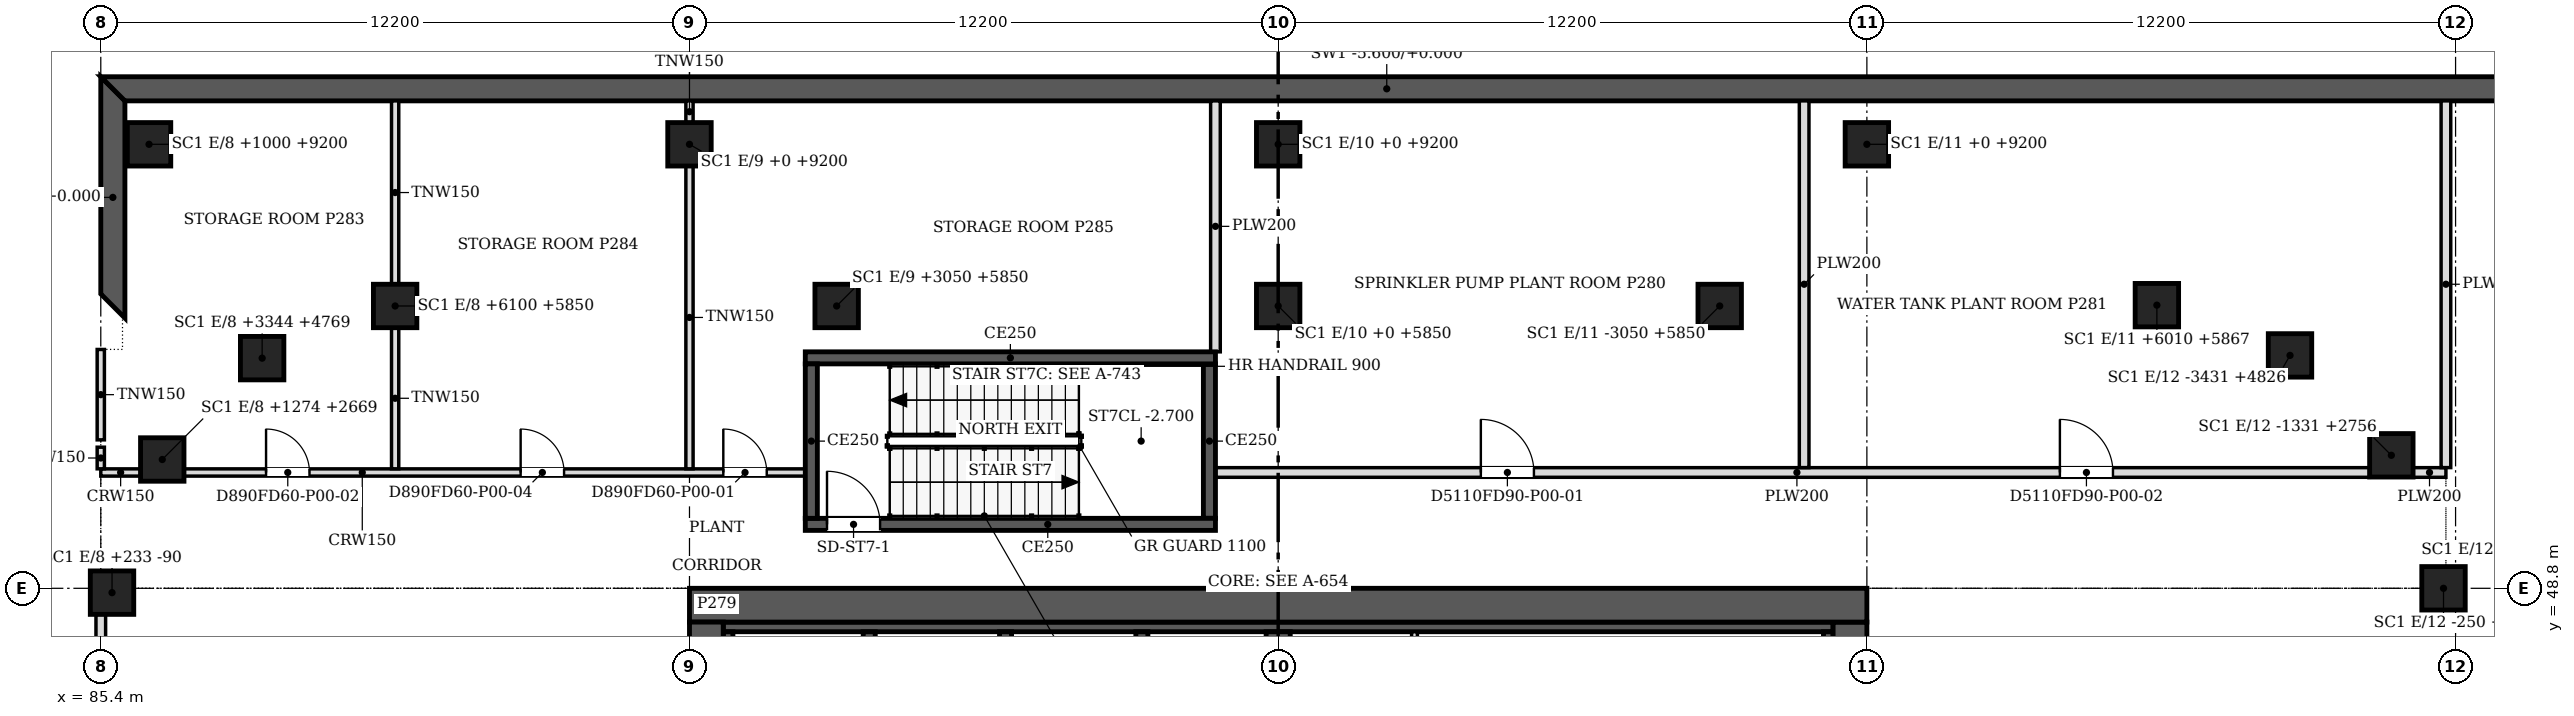
"""IFC4 building model, lengths in metres.
Left out: names, types, materials, properties, quantities, classifications, styles, units other than length and angle.
Written with IfcOpenShell. Run it as: python <this file> out.ifc"""

import sys

from ifc_helpers import new_model, si_unit, direction, frame, frame_2d, origin, origin_2d, place, context, subcontext, project, spatial, polyline, rectangle, outline, extrude, source, transform, mapped, element, fill, save


model = new_model("IFC4")
c1 = context("Model", 3, precision=1e-05, world=origin(), true_north=direction((0.0, 1.0)))
c2 = subcontext(c1, "Body", "Model", "MODEL_VIEW")
j1 = project(units=[si_unit("LENGTHUNIT", "METRE"), si_unit("PLANEANGLEUNIT", "RADIAN")], contexts=[c1])
p1 = place(None, origin())
s1 = spatial("IfcSite", under=j1, at=p1, CompositionType="ELEMENT")
p2 = place(p1, origin())
s2 = spatial("IfcBuilding", under=s1, at=p2, CompositionType="ELEMENT")
p3 = place(p2, frame((0.0, 0.0, -5.4)))
s3 = spatial("IfcBuildingStorey", under=s2, at=p3, CompositionType="ELEMENT", Elevation=-5.4)
p4 = place(p3, frame((0.0, 0.0, -0.2)))
e1 = element("IfcWall", 1, at=p4, inside=s3, PredefinedType="SOLIDWALL", context=c2, shape_type="SweptSolid", body=[
    extrude(outline(polyline([(60.5, 54.4), (85.9, 54.4), (85.4, 54.9), (61.0, 54.9), (60.5, 54.4)])), origin(), (0.0, 0.0, 1.0), 5.6),
])
p5 = place(p3, frame((0.0, 0.0, -0.2)))
e2 = element("IfcWall", 2, at=p5, inside=s3, PredefinedType="SOLIDWALL", context=c2, shape_type="SweptSolid", body=[
    extrude(outline(polyline([(85.4, 54.9), (85.9, 54.4), (85.9, 58.9), (85.4, 59.4), (85.4, 54.9)])), origin(), (0.0, 0.0, 1.0), 5.6),
])
p6 = place(p3, frame((0.0, 0.0, -0.2)))
e3 = element("IfcWall", 3, at=p6, inside=s3, PredefinedType="SOLIDWALL", context=c2, shape_type="SweptSolid", body=[
    extrude(outline(polyline([(85.4, 59.4), (85.9, 58.9), (138.2, 58.9), (138.7, 59.4), (85.4, 59.4)])), origin(), (0.0, 0.0, 1.0), 5.6),
])
for number, where, z_axis, x_axis in (
    (4, (133.95, 48.8, 0.0), (0.0, 0.0, 1.0), (1.0, 0.0, 0.0)),
    (5, (132.869, 51.556, 0.0), (0.0, 0.0, 1.0), (1.0, 0.0, 0.0)),
    (6, (130.769, 53.626, 0.0), (0.0, 0.0, 1.0), (1.0, 0.0, 0.0)),
    (7, (128.01, 54.667, 0.0), (0.0, 0.0, 1.0), (1.0, 0.0, 0.0)),
    (8, (118.95, 54.65, 0.0), (0.0, 0.0, 1.0), (1.0, 0.0, 0.0)),
    (9, (109.8, 54.65, 0.0), (0.0, 0.0, 1.0), (1.0, 0.0, 0.0)),
    (10, (100.65, 54.65, 0.0), (0.0, 0.0, 1.0), (1.0, 0.0, 0.0)),
    (11, (91.5, 54.65, 0.0), (0.0, 0.0, 1.0), (1.0, 0.0, 0.0)),
    (12, (88.744, 53.569, 0.0), (0.0, 0.0, 1.0), (1.0, 0.0, 0.0)),
    (13, (86.674, 51.469, 0.0), (0.0, 0.0, 1.0), (1.0, 0.0, 0.0)),
    (14, (85.633, 48.71, 0.0), (0.0, 0.0, 1.0), (1.0, 0.0, 0.0)),
    (15, (97.6, 58.0, 0.0), (0.0, 0.0, 1.0), (1.0, 0.0, 0.0)),
    (16, (109.8, 58.0, 0.0), (0.0, 0.0, 1.0), (1.0, 0.0, 0.0)),
    (17, (122.0, 58.0, 0.0), (0.0, 0.0, 1.0), (1.0, 0.0, 0.0)),
    (18, (85.4, 54.2, 0.0), (0.0, 0.0, 1.0), (1.0, 0.0, 0.0)),
    (19, (86.4, 58.0, 0.0), (0.0, 0.0, 1.0), (1.0, 0.0, 0.0)),
):
    element("IfcColumn", number, at=place(p3, frame(where, z_axis=z_axis, x_axis=x_axis)), inside=s3, PredefinedType="COLUMN", context=c2, shape_type="SweptSolid", body=[
        extrude(rectangle(XDim=0.9, YDim=0.9, at=origin_2d()), origin(), (0.0, 0.0, 1.0), 5.15),
    ])
p7 = place(p3, frame((97.95, 37.3, 0.0), z_axis=(0.0, 0.0, 1.0), x_axis=(0.0, 1.0, 0.0)))
e20 = element("IfcWall", 20, at=p7, inside=s3, PredefinedType="SHEAR", context=c2, shape_type="SweptSolid", body=[
    extrude(rectangle(XDim=10.8, YDim=0.7, at=frame_2d((5.4, 0.0))), origin(), (0.0, 0.0, 1.0), 5.4),
])
m1 = source(origin(), c2, "Body", "SweptSolid", [
    extrude(rectangle(XDim=2.1, YDim=2.4, at=frame_2d((1.05, 1.2))), frame((0.0, 0.36, 0.0), z_axis=(0.0, -1.0, 0.0), x_axis=(1.0, 0.0, 0.0)), (0.0, 0.0, 1.0), 0.72),
])
p8 = place(p7, frame((4.5, 0.0, 0.0)))
e21 = element("IfcOpeningElement", 21, at=p8, cuts=e20, PredefinedType="OPENING", context=c2, shape_type="MappedRepresentation", body=[
    mapped(m1, transform((0.0, 0.0, 0.0), scale=1.0)),
])
p9 = place(p3, frame((97.6, 48.45, 0.0), z_axis=(0.0, 0.0, 1.0), x_axis=(1.0, 0.0, 0.0)))
e22 = element("IfcWall", 22, at=p9, inside=s3, PredefinedType="SHEAR", context=c2, shape_type="SweptSolid", body=[
    extrude(rectangle(XDim=24.4, YDim=0.7, at=frame_2d((12.2, 0.0))), origin(), (0.0, 0.0, 1.0), 5.4),
])
p10 = place(p3, frame((121.65, 48.1, 0.0), z_axis=(0.0, 0.0, 1.0), x_axis=(0.0, -1.0, 0.0)))
e23 = element("IfcWall", 23, at=p10, inside=s3, PredefinedType="SHEAR", context=c2, shape_type="SweptSolid", body=[
    extrude(rectangle(XDim=10.8, YDim=0.7, at=frame_2d((5.4, 0.0))), origin(), (0.0, 0.0, 1.0), 5.4),
])
m2 = source(origin(), c2, "Body", "SweptSolid", [
    extrude(rectangle(XDim=1.2, YDim=2.1, at=frame_2d((0.6, 1.05))), frame((0.0, 0.36, 0.0), z_axis=(0.0, -1.0, 0.0), x_axis=(1.0, 0.0, 0.0)), (0.0, 0.0, 1.0), 0.72),
])
p11 = place(p10, frame((4.55, 0.0, 0.0)))
e24 = element("IfcOpeningElement", 24, at=p11, cuts=e23, PredefinedType="OPENING", context=c2, shape_type="MappedRepresentation", body=[
    mapped(m2, transform((0.0, 0.0, 0.0), scale=1.0)),
])
p12 = place(p3, frame((98.3, 48.0, 0.0), z_axis=(0.0, 0.0, 1.0), x_axis=(1.0, 0.0, 0.0)))
e25 = element("IfcWall", 25, at=p12, inside=s3, PredefinedType="SOLIDWALL", context=c2, shape_type="SweptSolid", body=[
    extrude(rectangle(XDim=23.0, YDim=0.2, at=frame_2d((11.5, 0.0))), origin(), (0.0, 0.0, 1.0), 5.4),
])
p13 = place(p3, frame((98.4, 43.9, 0.0), z_axis=(0.0, 0.0, 1.0), x_axis=(0.0, 1.0, 0.0)))
e26 = element("IfcWall", 26, at=p13, inside=s3, PredefinedType="SOLIDWALL", context=c2, shape_type="SweptSolid", body=[
    extrude(rectangle(XDim=4.0, YDim=0.2, at=frame_2d((2.0, 0.0))), origin(), (0.0, 0.0, 1.0), 5.4),
])
p14 = place(p3, frame((121.2, 43.55, 0.0), z_axis=(0.0, 0.0, 1.0), x_axis=(0.0, 1.0, 0.0)))
e27 = element("IfcWall", 27, at=p14, inside=s3, PredefinedType="SOLIDWALL", context=c2, shape_type="SweptSolid", body=[
    extrude(rectangle(XDim=4.35, YDim=0.2, at=frame_2d((2.175, 0.0))), origin(), (0.0, 0.0, 1.0), 5.4),
])
p15 = place(p3, frame((109.8, 45.2, 0.0), z_axis=(0.0, 0.0, 1.0), x_axis=(0.0, 1.0, 0.0)))
e28 = element("IfcWall", 28, at=p15, inside=s3, PredefinedType="SHEAR", context=c2, shape_type="SweptSolid", body=[
    extrude(rectangle(XDim=2.7, YDim=0.5, at=frame_2d((1.35, 0.0))), origin(), (0.0, 0.0, 1.0), 5.4),
])
for number, where, z_axis, x_axis in (
    (29, (101.325, 45.325, 0.0), (0.0, 0.0, 1.0), (0.0, 1.0, 0.0)),
    (30, (104.15, 45.325, 0.0), (0.0, 0.0, 1.0), (0.0, 1.0, 0.0)),
    (31, (106.975, 45.325, 0.0), (0.0, 0.0, 1.0), (0.0, 1.0, 0.0)),
):
    element("IfcWall", number, at=place(p3, frame(where, z_axis=z_axis, x_axis=x_axis)), inside=s3, PredefinedType="SOLIDWALL", context=c2, shape_type="SweptSolid", body=[
        extrude(rectangle(XDim=2.575, YDim=0.25, at=frame_2d((1.288, 0.0))), origin(), (0.0, 0.0, 1.0), 5.4),
    ])
p16 = place(p3, frame((112.625, 45.26, 0.0), z_axis=(0.0, 0.0, 1.0), x_axis=(0.0, 1.0, 0.0)))
e32 = element("IfcWall", 32, at=p16, inside=s3, PredefinedType="PARTITIONING", context=c2, shape_type="SweptSolid", body=[
    extrude(rectangle(XDim=2.64, YDim=0.12, at=frame_2d((1.32, 0.0))), origin(), (0.0, 0.0, 1.0), 5.15),
])
p17 = place(p3, frame((108.5, 50.125, 0.0), z_axis=(0.0, 0.0, 1.0), x_axis=(-1.0, 0.0, 0.0)))
e33 = element("IfcWall", 33, at=p17, inside=s3, PredefinedType="SOLIDWALL", context=c2, shape_type="SweptSolid", body=[
    extrude(rectangle(XDim=8.5, YDim=0.25, at=frame_2d((4.25, 0.0))), origin(), (0.0, 0.0, 1.0), 5.4),
])
m3 = source(origin(), c2, "Body", "SweptSolid", [
    extrude(rectangle(XDim=1.1, YDim=2.1, at=frame_2d((0.55, 1.05))), frame((0.0, 0.135, 0.0), z_axis=(0.0, -1.0, 0.0), x_axis=(1.0, 0.0, 0.0)), (0.0, 0.0, 1.0), 0.27),
])
p18 = place(p17, frame((6.95, 0.0, 0.0)))
e34 = element("IfcOpeningElement", 34, at=p18, cuts=e33, PredefinedType="OPENING", context=c2, shape_type="MappedRepresentation", body=[
    mapped(m3, transform((0.0, 0.0, 0.0), scale=1.0)),
])
p19 = place(p3, frame((100.125, 50.25, 0.0), z_axis=(0.0, 0.0, 1.0), x_axis=(0.0, 1.0, 0.0)))
e35 = element("IfcWall", 35, at=p19, inside=s3, PredefinedType="SOLIDWALL", context=c2, shape_type="SweptSolid", body=[
    extrude(rectangle(XDim=3.2, YDim=0.25, at=frame_2d((1.6, 0.0))), origin(), (0.0, 0.0, 1.0), 5.4),
])
p20 = place(p3, frame((100.0, 53.575, 0.0), z_axis=(0.0, 0.0, 1.0), x_axis=(1.0, 0.0, 0.0)))
e36 = element("IfcWall", 36, at=p20, inside=s3, PredefinedType="SOLIDWALL", context=c2, shape_type="SweptSolid", body=[
    extrude(rectangle(XDim=8.5, YDim=0.25, at=frame_2d((4.25, 0.0))), origin(), (0.0, 0.0, 1.0), 5.4),
])
p21 = place(p3, frame((108.375, 53.45, 0.0), z_axis=(0.0, 0.0, 1.0), x_axis=(0.0, -1.0, 0.0)))
e37 = element("IfcWall", 37, at=p21, inside=s3, PredefinedType="SOLIDWALL", context=c2, shape_type="SweptSolid", body=[
    extrude(rectangle(XDim=3.2, YDim=0.25, at=frame_2d((1.6, 0.0))), origin(), (0.0, 0.0, 1.0), 5.4),
])
p22 = place(p3, frame((85.4, 42.101, 0.0), z_axis=(0.0, 0.0, 1.0), x_axis=(0.0, 1.0, 0.0)))
e38 = element("IfcWall", 38, at=p22, inside=s3, PredefinedType="PARTITIONING", context=c2, shape_type="SweptSolid", body=[
    extrude(rectangle(XDim=6.158, YDim=0.2, at=frame_2d((3.079, 0.0))), origin(), (0.0, 0.0, 1.0), 4.315),
])
p23 = place(p3, frame((73.651, 48.8, 0.0), z_axis=(0.0, 0.0, 1.0), x_axis=(1.0, 0.0, 0.0)))
e39 = element("IfcWall", 39, at=p23, inside=s3, PredefinedType="PARTITIONING", context=c2, shape_type="SweptSolid", body=[
    extrude(rectangle(XDim=11.531, YDim=0.2, at=frame_2d((5.766, 0.0))), origin(), (0.0, 0.0, 1.0), 4.315),
])
p24 = place(p3, frame((85.4, 51.2, 0.0), z_axis=(0.0, 0.0, 1.0), x_axis=(1.0, 0.0, 0.0)))
e40 = element("IfcWall", 40, at=p24, inside=s3, PredefinedType="PARTITIONING", context=c2, shape_type="SweptSolid", body=[
    extrude(rectangle(XDim=0.823, YDim=0.15, at=frame_2d((0.412, 0.0))), origin(), (0.0, 0.0, 1.0), 4.315),
])
p25 = place(p3, frame((87.125, 51.2, 0.0), z_axis=(0.0, 0.0, 1.0), x_axis=(1.0, 0.0, 0.0)))
e41 = element("IfcWall", 41, at=p25, inside=s3, PredefinedType="PARTITIONING", context=c2, shape_type="SweptSolid", body=[
    extrude(rectangle(XDim=12.875, YDim=0.15, at=frame_2d((6.438, 0.0))), origin(), (0.0, 0.0, 1.0), 4.315),
])
m4 = source(origin(), c2, "Body", "SweptSolid", [
    extrude(rectangle(XDim=0.9, YDim=2.1, at=frame_2d((0.45, 1.05))), frame((0.0, 0.085, 0.0), z_axis=(0.0, -1.0, 0.0), x_axis=(1.0, 0.0, 0.0)), (0.0, 0.0, 1.0), 0.17),
])
p26 = place(p25, frame((11.176, 0.0, 0.0)))
e42 = element("IfcOpeningElement", 42, at=p26, cuts=e41, PredefinedType="OPENING", context=c2, shape_type="MappedRepresentation", body=[
    mapped(m4, transform((0.0, 0.0, 0.0), scale=1.0)),
])
p27 = place(p25, frame((1.7, 0.0, 0.0)))
e43 = element("IfcOpeningElement", 43, at=p27, cuts=e41, PredefinedType="OPENING", context=c2, shape_type="MappedRepresentation", body=[
    mapped(m4, transform((0.0, 0.0, 0.0), scale=1.0)),
])
p28 = place(p25, frame((6.976, 0.0, 0.0)))
e44 = element("IfcOpeningElement", 44, at=p28, cuts=e41, PredefinedType="OPENING", context=c2, shape_type="MappedRepresentation", body=[
    mapped(m4, transform((0.0, 0.0, 0.0), scale=1.0)),
])
p29 = place(p3, frame((108.5, 51.2, 0.0), z_axis=(0.0, 0.0, 1.0), x_axis=(1.0, 0.0, 0.0)))
e45 = element("IfcWall", 45, at=p29, inside=s3, PredefinedType="PARTITIONING", context=c2, shape_type="SweptSolid", body=[
    extrude(rectangle(XDim=23.918, YDim=0.2, at=frame_2d((11.959, 0.0))), origin(), (0.0, 0.0, 1.0), 4.315),
])
m5 = source(origin(), c2, "Body", "SweptSolid", [
    extrude(rectangle(XDim=1.1, YDim=2.1, at=frame_2d((0.55, 1.05))), frame((0.0, 0.11, 0.0), z_axis=(0.0, -1.0, 0.0), x_axis=(1.0, 0.0, 0.0)), (0.0, 0.0, 1.0), 0.22),
])
p30 = place(p29, frame((5.5, 0.0, 0.0)))
e46 = element("IfcOpeningElement", 46, at=p30, cuts=e45, PredefinedType="OPENING", context=c2, shape_type="MappedRepresentation", body=[
    mapped(m5, transform((0.0, 0.0, 0.0), scale=1.0)),
])
p31 = place(p29, frame((17.5, 0.0, 0.0)))
e47 = element("IfcOpeningElement", 47, at=p31, cuts=e45, PredefinedType="OPENING", context=c2, shape_type="MappedRepresentation", body=[
    mapped(m5, transform((0.0, 0.0, 0.0), scale=1.0)),
])
p32 = place(p3, frame((133.32, 51.2, 0.0), z_axis=(0.0, 0.0, 1.0), x_axis=(1.0, 0.0, 0.0)))
e48 = element("IfcWall", 48, at=p32, inside=s3, PredefinedType="PARTITIONING", context=c2, shape_type="SweptSolid", body=[
    extrude(rectangle(XDim=0.68, YDim=0.2, at=frame_2d((0.34, 0.0))), origin(), (0.0, 0.0, 1.0), 4.315),
])
p33 = place(p3, frame((85.4, 51.276, 0.0), z_axis=(0.0, 0.0, 1.0), x_axis=(0.0, 1.0, 0.0)))
e49 = element("IfcWall", 49, at=p33, inside=s3, PredefinedType="PARTITIONING", context=c2, shape_type="SweptSolid", body=[
    extrude(rectangle(XDim=0.448, YDim=0.15, at=frame_2d((0.224, 0.0))), origin(), (0.0, 0.0, 1.0), 4.315),
])
p34 = place(p3, frame((91.5, 51.276, 0.0), z_axis=(0.0, 0.0, 1.0), x_axis=(0.0, 1.0, 0.0)))
e50 = element("IfcWall", 50, at=p34, inside=s3, PredefinedType="PARTITIONING", context=c2, shape_type="SweptSolid", body=[
    extrude(rectangle(XDim=2.923, YDim=0.15, at=frame_2d((1.461, 0.0))), origin(), (0.0, 0.0, 1.0), 4.315),
])
p35 = place(p3, frame((97.6, 51.276, 0.0), z_axis=(0.0, 0.0, 1.0), x_axis=(0.0, 1.0, 0.0)))
e51 = element("IfcWall", 51, at=p35, inside=s3, PredefinedType="PARTITIONING", context=c2, shape_type="SweptSolid", body=[
    extrude(rectangle(XDim=6.273, YDim=0.15, at=frame_2d((3.137, 0.0))), origin(), (0.0, 0.0, 1.0), 4.315),
])
for number, where, z_axis, x_axis in (
    (52, (120.7, 51.301, 0.0), (0.0, 0.0, 1.0), (0.0, 1.0, 0.0)),
    (53, (134.0, 51.301, 0.0), (0.0, 0.0, 1.0), (0.0, 1.0, 0.0)),
):
    element("IfcWall", number, at=place(p3, frame(where, z_axis=z_axis, x_axis=x_axis)), inside=s3, PredefinedType="PARTITIONING", context=c2, shape_type="SweptSolid", body=[
        extrude(rectangle(XDim=7.599, YDim=0.2, at=frame_2d((3.799, 0.0))), origin(), (0.0, 0.0, 1.0), 4.315),
    ])
p36 = place(p3, frame((61.0, 51.8, 0.0), z_axis=(0.0, 0.0, 1.0), x_axis=(1.0, 0.0, 0.0)))
e54 = element("IfcWall", 54, at=p36, inside=s3, PredefinedType="PARTITIONING", context=c2, shape_type="SweptSolid", body=[
    extrude(rectangle(XDim=24.4, YDim=0.15, at=frame_2d((12.2, 0.0))), origin(), (0.0, 0.0, 1.0), 4.315),
])
p37 = place(p3, frame((85.4, 51.876, 0.0), z_axis=(0.0, 0.0, 1.0), x_axis=(0.0, 1.0, 0.0)))
e55 = element("IfcWall", 55, at=p37, inside=s3, PredefinedType="PARTITIONING", context=c2, shape_type="SweptSolid", body=[
    extrude(rectangle(XDim=1.873, YDim=0.15, at=frame_2d((0.937, 0.0))), origin(), (0.0, 0.0, 1.0), 4.315),
])
p38 = place(p3, frame((108.5, 53.7, 0.0), z_axis=(0.0, 0.0, 1.0), x_axis=(0.0, 1.0, 0.0)))
e56 = element("IfcWall", 56, at=p38, inside=s3, PredefinedType="PARTITIONING", context=c2, shape_type="SweptSolid", body=[
    extrude(rectangle(XDim=5.2, YDim=0.2, at=frame_2d((2.6, 0.0))), origin(), (0.0, 0.0, 1.0), 4.315),
])
p39 = place(p3, frame((91.5, 55.101, 0.0), z_axis=(0.0, 0.0, 1.0), x_axis=(0.0, 1.0, 0.0)))
e57 = element("IfcWall", 57, at=p39, inside=s3, PredefinedType="PARTITIONING", context=c2, shape_type="SweptSolid", body=[
    extrude(rectangle(XDim=3.799, YDim=0.15, at=frame_2d((1.899, 0.0))), origin(), (0.0, 0.0, 1.0), 4.315),
])
p40 = place(p3, frame((97.6, 58.451, 0.0), z_axis=(0.0, 0.0, 1.0), x_axis=(0.0, 1.0, 0.0)))
e58 = element("IfcWall", 58, at=p40, inside=s3, PredefinedType="PARTITIONING", context=c2, shape_type="SweptSolid", body=[
    extrude(rectangle(XDim=0.449, YDim=0.15, at=frame_2d((0.225, 0.0))), origin(), (0.0, 0.0, 1.0), 4.315),
])
m6 = source(origin(), c2, "Body", "SweptSolid", [
    extrude(rectangle(XDim=1.1, YDim=2.1, at=frame_2d((0.55, 1.05))), frame((0.0, 0.025, 0.0), z_axis=(0.0, -1.0, 0.0), x_axis=(1.0, 0.0, 0.0)), (0.0, 0.0, 1.0), 0.05),
])
p41 = place(p18, origin())
e59 = element("IfcDoor", 59, at=p41, inside=s3, OperationType="SINGLE_SWING_RIGHT", PredefinedType="DOOR", context=c2, shape_type="MappedRepresentation", body=[
    mapped(m6, transform((0.0, 0.0, 0.0), scale=1.0)),
])
fill(e34, e59)
m7 = source(origin(), c2, "Body", "SweptSolid", [
    extrude(rectangle(XDim=0.9, YDim=2.1, at=frame_2d((0.45, 1.05))), frame((0.0, 0.025, 0.0), z_axis=(0.0, -1.0, 0.0), x_axis=(1.0, 0.0, 0.0)), (0.0, 0.0, 1.0), 0.05),
])
p42 = place(p26, origin())
e60 = element("IfcDoor", 60, at=p42, inside=s3, OperationType="SINGLE_SWING_LEFT", PredefinedType="DOOR", context=c2, shape_type="MappedRepresentation", body=[
    mapped(m7, transform((0.0, 0.0, 0.0), scale=1.0)),
])
fill(e42, e60)
p43 = place(p27, origin())
e61 = element("IfcDoor", 61, at=p43, inside=s3, OperationType="SINGLE_SWING_LEFT", PredefinedType="DOOR", context=c2, shape_type="MappedRepresentation", body=[
    mapped(m7, transform((0.0, 0.0, 0.0), scale=1.0)),
])
fill(e43, e61)
p44 = place(p28, origin())
e62 = element("IfcDoor", 62, at=p44, inside=s3, OperationType="SINGLE_SWING_LEFT", PredefinedType="DOOR", context=c2, shape_type="MappedRepresentation", body=[
    mapped(m7, transform((0.0, 0.0, 0.0), scale=1.0)),
])
fill(e44, e62)
p45 = place(p30, origin())
e63 = element("IfcDoor", 63, at=p45, inside=s3, OperationType="SINGLE_SWING_LEFT", PredefinedType="DOOR", context=c2, shape_type="MappedRepresentation", body=[
    mapped(m6, transform((0.0, 0.0, 0.0), scale=1.0)),
])
fill(e46, e63)
p46 = place(p31, origin())
e64 = element("IfcDoor", 64, at=p46, inside=s3, OperationType="SINGLE_SWING_LEFT", PredefinedType="DOOR", context=c2, shape_type="MappedRepresentation", body=[
    mapped(m6, transform((0.0, 0.0, 0.0), scale=1.0)),
])
fill(e47, e64)
save(model, sys.argv[1])
